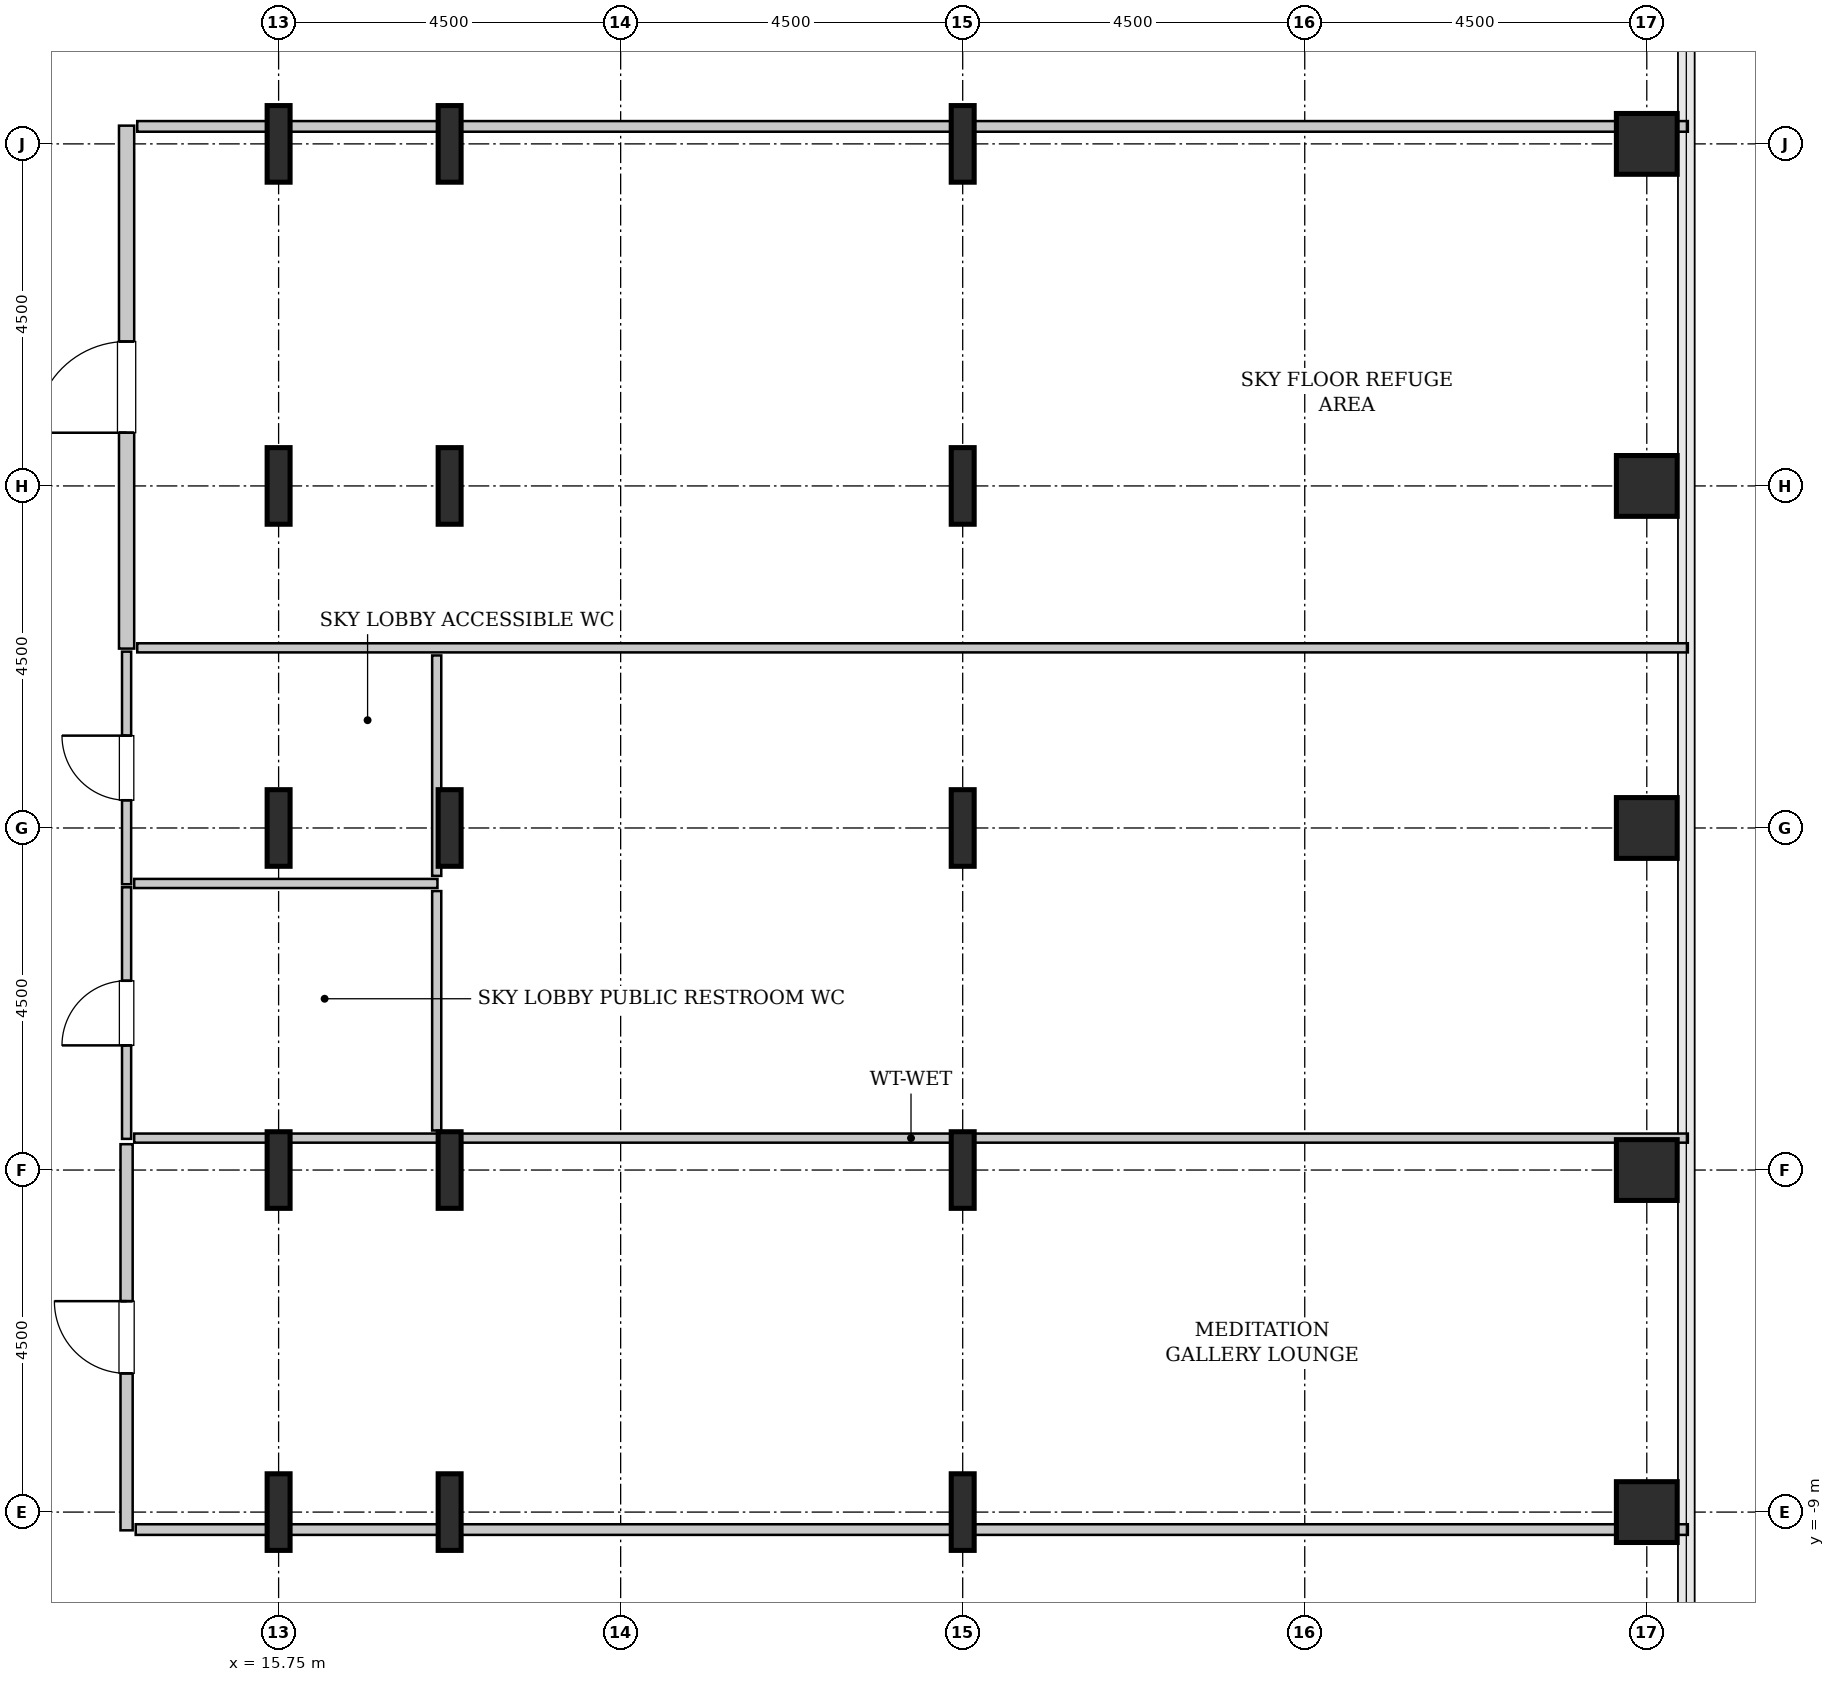
"""IFC4 building model, lengths in metres.
Left out: names, types, materials, properties, quantities, classifications, styles, units other than length and angle.
Written with IfcOpenShell. Run it as: python <this file> out.ifc"""

import sys

from ifc_helpers import new_model, si_unit, direction, frame, frame_2d, origin, origin_2d, place, context, subcontext, project, spatial, rectangle, hollow_rectangle, i_section, extrude, source, transform, mapped, element, fill, save


model = new_model("IFC4")
c1 = context("Model", 3, precision=1e-05, world=origin(), true_north=direction((0.0, 1.0)))
c2 = subcontext(c1, "Body", "Model", "MODEL_VIEW")
j1 = project(units=[si_unit("LENGTHUNIT", "METRE"), si_unit("PLANEANGLEUNIT", "RADIAN")], contexts=[c1])
p1 = place(None, origin())
s1 = spatial("IfcSite", under=j1, at=p1, CompositionType="ELEMENT")
p2 = place(p1, origin())
s2 = spatial("IfcBuilding", under=s1, at=p2, CompositionType="ELEMENT")
p3 = place(p2, frame((0.0, 0.0, 144.0)))
s3 = spatial("IfcBuildingStorey", under=s2, at=p3, CompositionType="ELEMENT", Elevation=144.0)
m1 = source(origin(), c2, "Body", "SweptSolid", [
    extrude(i_section(OverallWidth=0.302, OverallDepth=1.008, WebThickness=0.021, FlangeThickness=0.04, FilletRadius=0.03, at=origin_2d()), origin(), (0.0, 0.0, 1.0), 4.8),
])
for number, where, z_axis, x_axis in (
    (1, (15.75, -9.0, 0.0), (0.0, 0.0, 1.0), (1.0, 0.0, 0.0)),
    (2, (15.75, -4.5, 0.0), (0.0, 0.0, 1.0), (1.0, 0.0, 0.0)),
    (3, (15.75, 0.0, 0.0), (0.0, 0.0, 1.0), (1.0, 0.0, 0.0)),
    (4, (15.75, 4.5, 0.0), (0.0, 0.0, 1.0), (1.0, 0.0, 0.0)),
    (5, (15.75, 9.0, 0.0), (0.0, 0.0, 1.0), (1.0, 0.0, 0.0)),
    (6, (18.0, -9.0, 0.0), (0.0, 0.0, 1.0), (1.0, 0.0, 0.0)),
    (7, (18.0, -4.5, 0.0), (0.0, 0.0, 1.0), (1.0, 0.0, 0.0)),
    (8, (18.0, 0.0, 0.0), (0.0, 0.0, 1.0), (1.0, 0.0, 0.0)),
    (9, (18.0, 4.5, 0.0), (0.0, 0.0, 1.0), (1.0, 0.0, 0.0)),
    (10, (18.0, 9.0, 0.0), (0.0, 0.0, 1.0), (1.0, 0.0, 0.0)),
    (11, (24.75, -9.0, 0.0), (0.0, 0.0, 1.0), (1.0, 0.0, 0.0)),
    (12, (24.75, -4.5, 0.0), (0.0, 0.0, 1.0), (1.0, 0.0, 0.0)),
    (13, (24.75, 0.0, 0.0), (0.0, 0.0, 1.0), (1.0, 0.0, 0.0)),
    (14, (24.75, 4.5, 0.0), (0.0, 0.0, 1.0), (1.0, 0.0, 0.0)),
    (15, (24.75, 9.0, 0.0), (0.0, 0.0, 1.0), (1.0, 0.0, 0.0)),
):
    element("IfcColumn", number, at=place(p3, frame(where, z_axis=z_axis, x_axis=x_axis)), inside=s3, PredefinedType="COLUMN", context=c2, shape_type="MappedRepresentation", body=[
        mapped(m1, transform((0.0, 0.0, 0.0), x_axis=(1.0, 0.0, 0.0), y_axis=(0.0, 1.0, 0.0), z_axis=(0.0, 0.0, 1.0), scale=1.0)),
    ])
m2 = source(origin(), c2, "Body", "SweptSolid", [
    extrude(hollow_rectangle(XDim=0.8, YDim=0.8, WallThickness=0.04, InnerFilletRadius=0.04, OuterFilletRadius=0.08, at=origin_2d()), origin(), (0.0, 0.0, 1.0), 4.8),
])
for number, where, z_axis, x_axis in (
    (16, (33.75, -9.0, 0.0), (0.0, 0.0, 1.0), (1.0, 0.0, 0.0)),
    (17, (33.75, -4.5, 0.0), (0.0, 0.0, 1.0), (1.0, 0.0, 0.0)),
    (18, (33.75, 0.0, 0.0), (0.0, 0.0, 1.0), (1.0, 0.0, 0.0)),
    (19, (33.75, 4.5, 0.0), (0.0, 0.0, 1.0), (1.0, 0.0, 0.0)),
    (20, (33.75, 9.0, 0.0), (0.0, 0.0, 1.0), (1.0, 0.0, 0.0)),
):
    element("IfcColumn", number, at=place(p3, frame(where, z_axis=z_axis, x_axis=x_axis)), inside=s3, PredefinedType="COLUMN", context=c2, shape_type="MappedRepresentation", body=[
        mapped(m2, transform((0.0, 0.0, 0.0), x_axis=(1.0, 0.0, 0.0), y_axis=(0.0, 1.0, 0.0), z_axis=(0.0, 0.0, 1.0), scale=1.0)),
    ])
m3 = source(origin(), c2, "Body", "SweptSolid", [
    extrude(rectangle(XDim=6.88, YDim=0.2, at=frame_2d((3.44, 0.0))), origin(), (0.0, 0.0, 1.0), 4.535),
])
p4 = place(p3, frame((13.75, 2.36, 0.0), z_axis=(0.0, 0.0, 1.0), x_axis=(0.0, 1.0, 0.0)))
e21 = element("IfcWall", 21, at=p4, inside=s3, PredefinedType="SOLIDWALL", context=c2, shape_type="MappedRepresentation", body=[
    mapped(m3, transform((0.0, 0.0, 0.0), x_axis=(1.0, 0.0, 0.0), y_axis=(0.0, 1.0, 0.0), z_axis=(0.0, 0.0, 1.0), scale=1.0)),
])
p5 = place(p4, frame((2.84, 0.0, 0.0)))
e22 = element("IfcOpeningElement", 22, at=p5, cuts=e21, PredefinedType="OPENING", context=c2, shape_type="SweptSolid", body=[
    extrude(rectangle(XDim=1.2, YDim=2.15, at=frame_2d((0.6, 1.075))), frame((0.0, 0.11, 0.0), z_axis=(0.0, -1.0, 0.0), x_axis=(1.0, 0.0, 0.0)), (0.0, 0.0, 1.0), 0.22),
])
m4 = source(origin(), c2, "Body", "SweptSolid", [
    extrude(rectangle(XDim=20.4, YDim=0.14, at=frame_2d((10.2, 0.0))), origin(), (0.0, 0.0, 1.0), 3.875),
])
p6 = place(p3, frame((13.89, 9.23, 0.0), z_axis=(0.0, 0.0, 1.0), x_axis=(1.0, 0.0, 0.0)))
e23 = element("IfcWall", 23, at=p6, inside=s3, PredefinedType="PARTITIONING", context=c2, shape_type="MappedRepresentation", body=[
    mapped(m4, transform((0.0, 0.0, 0.0), x_axis=(1.0, 0.0, 0.0), y_axis=(0.0, 1.0, 0.0), z_axis=(0.0, 0.0, 1.0), scale=1.0)),
])
m5 = source(origin(), c2, "Body", "SweptSolid", [
    extrude(rectangle(XDim=20.4, YDim=0.12, at=frame_2d((10.2, 0.0))), origin(), (0.0, 0.0, 1.0), 4.535),
])
p7 = place(p3, frame((13.89, 2.37, 0.0), z_axis=(0.0, 0.0, 1.0), x_axis=(1.0, 0.0, 0.0)))
e24 = element("IfcWall", 24, at=p7, inside=s3, PredefinedType="PLUMBINGWALL", context=c2, shape_type="MappedRepresentation", body=[
    mapped(m5, transform((0.0, 0.0, 0.0), x_axis=(1.0, 0.0, 0.0), y_axis=(0.0, 1.0, 0.0), z_axis=(0.0, 0.0, 1.0), scale=1.0)),
])
m6 = source(origin(), c2, "Body", "SweptSolid", [
    extrude(rectangle(XDim=3.06, YDim=0.12, at=frame_2d((1.53, 0.0))), origin(), (0.0, 0.0, 1.0), 4.535),
])
p8 = place(p3, frame((13.75, -0.74, 0.0), z_axis=(0.0, 0.0, 1.0), x_axis=(0.0, 1.0, 0.0)))
e25 = element("IfcWall", 25, at=p8, inside=s3, PredefinedType="PLUMBINGWALL", context=c2, shape_type="MappedRepresentation", body=[
    mapped(m6, transform((0.0, 0.0, 0.0), x_axis=(1.0, 0.0, 0.0), y_axis=(0.0, 1.0, 0.0), z_axis=(0.0, 0.0, 1.0), scale=1.0)),
])
p9 = place(p8, frame((1.105, 0.0, 0.0)))
e26 = element("IfcOpeningElement", 26, at=p9, cuts=e25, PredefinedType="OPENING", context=c2, shape_type="SweptSolid", body=[
    extrude(rectangle(XDim=0.85, YDim=2.1, at=frame_2d((0.425, 1.05))), frame((0.0, 0.07, 0.0), z_axis=(0.0, -1.0, 0.0), x_axis=(1.0, 0.0, 0.0)), (0.0, 0.0, 1.0), 0.14),
])
m7 = source(origin(), c2, "Body", "SweptSolid", [
    extrude(rectangle(XDim=3.99, YDim=0.12, at=frame_2d((1.995, 0.0))), origin(), (0.0, 0.0, 1.0), 4.535),
])
p10 = place(p3, frame((13.85, -0.73, 0.0), z_axis=(0.0, 0.0, 1.0), x_axis=(1.0, 0.0, 0.0)))
e27 = element("IfcWall", 27, at=p10, inside=s3, PredefinedType="PLUMBINGWALL", context=c2, shape_type="MappedRepresentation", body=[
    mapped(m7, transform((0.0, 0.0, 0.0), x_axis=(1.0, 0.0, 0.0), y_axis=(0.0, 1.0, 0.0), z_axis=(0.0, 0.0, 1.0), scale=1.0)),
])
m8 = source(origin(), c2, "Body", "SweptSolid", [
    extrude(rectangle(XDim=2.9, YDim=0.12, at=frame_2d((1.45, 0.0))), origin(), (0.0, 0.0, 1.0), 3.875),
])
p11 = place(p3, frame((17.83, -0.63, 0.0), z_axis=(0.0, 0.0, 1.0), x_axis=(0.0, 1.0, 0.0)))
e28 = element("IfcWall", 28, at=p11, inside=s3, PredefinedType="PLUMBINGWALL", context=c2, shape_type="MappedRepresentation", body=[
    mapped(m8, transform((0.0, 0.0, 0.0), x_axis=(1.0, 0.0, 0.0), y_axis=(0.0, 1.0, 0.0), z_axis=(0.0, 0.0, 1.0), scale=1.0)),
])
m9 = source(origin(), c2, "Body", "SweptSolid", [
    extrude(rectangle(XDim=3.31, YDim=0.12, at=frame_2d((1.655, 0.0))), origin(), (0.0, 0.0, 1.0), 4.535),
])
p12 = place(p3, frame((13.75, -4.09, 0.0), z_axis=(0.0, 0.0, 1.0), x_axis=(0.0, 1.0, 0.0)))
e29 = element("IfcWall", 29, at=p12, inside=s3, PredefinedType="PLUMBINGWALL", context=c2, shape_type="MappedRepresentation", body=[
    mapped(m9, transform((0.0, 0.0, 0.0), x_axis=(1.0, 0.0, 0.0), y_axis=(0.0, 1.0, 0.0), z_axis=(0.0, 0.0, 1.0), scale=1.0)),
])
p13 = place(p12, frame((1.23, 0.0, 0.0)))
e30 = element("IfcOpeningElement", 30, at=p13, cuts=e29, PredefinedType="OPENING", context=c2, shape_type="SweptSolid", body=[
    extrude(rectangle(XDim=0.85, YDim=2.1, at=frame_2d((0.425, 1.05))), frame((0.0, 0.07, 0.0), z_axis=(0.0, -1.0, 0.0), x_axis=(1.0, 0.0, 0.0)), (0.0, 0.0, 1.0), 0.14),
])
m10 = source(origin(), c2, "Body", "SweptSolid", [
    extrude(rectangle(XDim=20.44, YDim=0.12, at=frame_2d((10.22, 0.0))), origin(), (0.0, 0.0, 1.0), 3.875),
])
p14 = place(p3, frame((13.85, -4.08, 0.0), z_axis=(0.0, 0.0, 1.0), x_axis=(1.0, 0.0, 0.0)))
e31 = element("IfcWall", 31, at=p14, inside=s3, PredefinedType="PLUMBINGWALL", context=c2, shape_type="MappedRepresentation", body=[
    mapped(m10, transform((0.0, 0.0, 0.0), x_axis=(1.0, 0.0, 0.0), y_axis=(0.0, 1.0, 0.0), z_axis=(0.0, 0.0, 1.0), scale=1.0)),
])
m11 = source(origin(), c2, "Body", "SweptSolid", [
    extrude(rectangle(XDim=3.15, YDim=0.12, at=frame_2d((1.575, 0.0))), origin(), (0.0, 0.0, 1.0), 3.875),
])
p15 = place(p3, frame((17.83, -3.98, 0.0), z_axis=(0.0, 0.0, 1.0), x_axis=(0.0, 1.0, 0.0)))
e32 = element("IfcWall", 32, at=p15, inside=s3, PredefinedType="PLUMBINGWALL", context=c2, shape_type="MappedRepresentation", body=[
    mapped(m11, transform((0.0, 0.0, 0.0), x_axis=(1.0, 0.0, 0.0), y_axis=(0.0, 1.0, 0.0), z_axis=(0.0, 0.0, 1.0), scale=1.0)),
])
m12 = source(origin(), c2, "Body", "SweptSolid", [
    extrude(rectangle(XDim=5.08, YDim=0.16, at=frame_2d((2.54, 0.0))), origin(), (0.0, 0.0, 1.0), 4.535),
])
p16 = place(p3, frame((13.75, -9.24, 0.0), z_axis=(0.0, 0.0, 1.0), x_axis=(0.0, 1.0, 0.0)))
e33 = element("IfcWall", 33, at=p16, inside=s3, PredefinedType="PARTITIONING", context=c2, shape_type="MappedRepresentation", body=[
    mapped(m12, transform((0.0, 0.0, 0.0), x_axis=(1.0, 0.0, 0.0), y_axis=(0.0, 1.0, 0.0), z_axis=(0.0, 0.0, 1.0), scale=1.0)),
])
p17 = place(p16, frame((2.065, 0.0, 0.0)))
e34 = element("IfcOpeningElement", 34, at=p17, cuts=e33, PredefinedType="OPENING", context=c2, shape_type="SweptSolid", body=[
    extrude(rectangle(XDim=0.95, YDim=2.1, at=frame_2d((0.475, 1.05))), frame((0.0, 0.09, 0.0), z_axis=(0.0, -1.0, 0.0), x_axis=(1.0, 0.0, 0.0)), (0.0, 0.0, 1.0), 0.18),
])
m13 = source(origin(), c2, "Body", "SweptSolid", [
    extrude(rectangle(XDim=20.42, YDim=0.14, at=frame_2d((10.21, 0.0))), origin(), (0.0, 0.0, 1.0), 3.875),
])
p18 = place(p3, frame((13.87, -9.23, 0.0), z_axis=(0.0, 0.0, 1.0), x_axis=(1.0, 0.0, 0.0)))
e35 = element("IfcWall", 35, at=p18, inside=s3, PredefinedType="PARTITIONING", context=c2, shape_type="MappedRepresentation", body=[
    mapped(m13, transform((0.0, 0.0, 0.0), x_axis=(1.0, 0.0, 0.0), y_axis=(0.0, 1.0, 0.0), z_axis=(0.0, 0.0, 1.0), scale=1.0)),
])
m14 = source(origin(), c2, "Body", "SweptSolid", [
    extrude(rectangle(XDim=1.2, YDim=2.15, at=frame_2d((0.6, 1.075))), frame((0.0, 0.025, 0.0), z_axis=(0.0, -1.0, 0.0), x_axis=(1.0, 0.0, 0.0)), (0.0, 0.0, 1.0), 0.05),
])
p19 = place(p5, origin())
e36 = element("IfcDoor", 36, at=p19, inside=s3, OperationType="SINGLE_SWING_LEFT", PredefinedType="DOOR", context=c2, shape_type="MappedRepresentation", body=[
    mapped(m14, transform((0.0, 0.0, 0.0), x_axis=(1.0, 0.0, 0.0), y_axis=(0.0, 1.0, 0.0), z_axis=(0.0, 0.0, 1.0), scale=1.0)),
])
fill(e22, e36)
m15 = source(origin(), c2, "Body", "SweptSolid", [
    extrude(rectangle(XDim=0.85, YDim=2.1, at=frame_2d((0.425, 1.05))), frame((0.0, 0.025, 0.0), z_axis=(0.0, -1.0, 0.0), x_axis=(1.0, 0.0, 0.0)), (0.0, 0.0, 1.0), 0.05),
])
p20 = place(p9, origin())
e37 = element("IfcDoor", 37, at=p20, inside=s3, OperationType="SINGLE_SWING_RIGHT", PredefinedType="DOOR", context=c2, shape_type="MappedRepresentation", body=[
    mapped(m15, transform((0.0, 0.0, 0.0), x_axis=(1.0, 0.0, 0.0), y_axis=(0.0, 1.0, 0.0), z_axis=(0.0, 0.0, 1.0), scale=1.0)),
])
fill(e26, e37)
p21 = place(p13, origin())
e38 = element("IfcDoor", 38, at=p21, inside=s3, OperationType="SINGLE_SWING_LEFT", PredefinedType="DOOR", context=c2, shape_type="MappedRepresentation", body=[
    mapped(m15, transform((0.0, 0.0, 0.0), x_axis=(1.0, 0.0, 0.0), y_axis=(0.0, 1.0, 0.0), z_axis=(0.0, 0.0, 1.0), scale=1.0)),
])
fill(e30, e38)
m16 = source(origin(), c2, "Body", "SweptSolid", [
    extrude(rectangle(XDim=0.95, YDim=2.1, at=frame_2d((0.475, 1.05))), frame((0.0, 0.025, 0.0), z_axis=(0.0, -1.0, 0.0), x_axis=(1.0, 0.0, 0.0)), (0.0, 0.0, 1.0), 0.05),
])
p22 = place(p17, origin())
e39 = element("IfcDoor", 39, at=p22, inside=s3, OperationType="SINGLE_SWING_RIGHT", PredefinedType="DOOR", context=c2, shape_type="MappedRepresentation", body=[
    mapped(m16, transform((0.0, 0.0, 0.0), x_axis=(1.0, 0.0, 0.0), y_axis=(0.0, 1.0, 0.0), z_axis=(0.0, 0.0, 1.0), scale=1.0)),
])
fill(e34, e39)
save(model, sys.argv[1])
